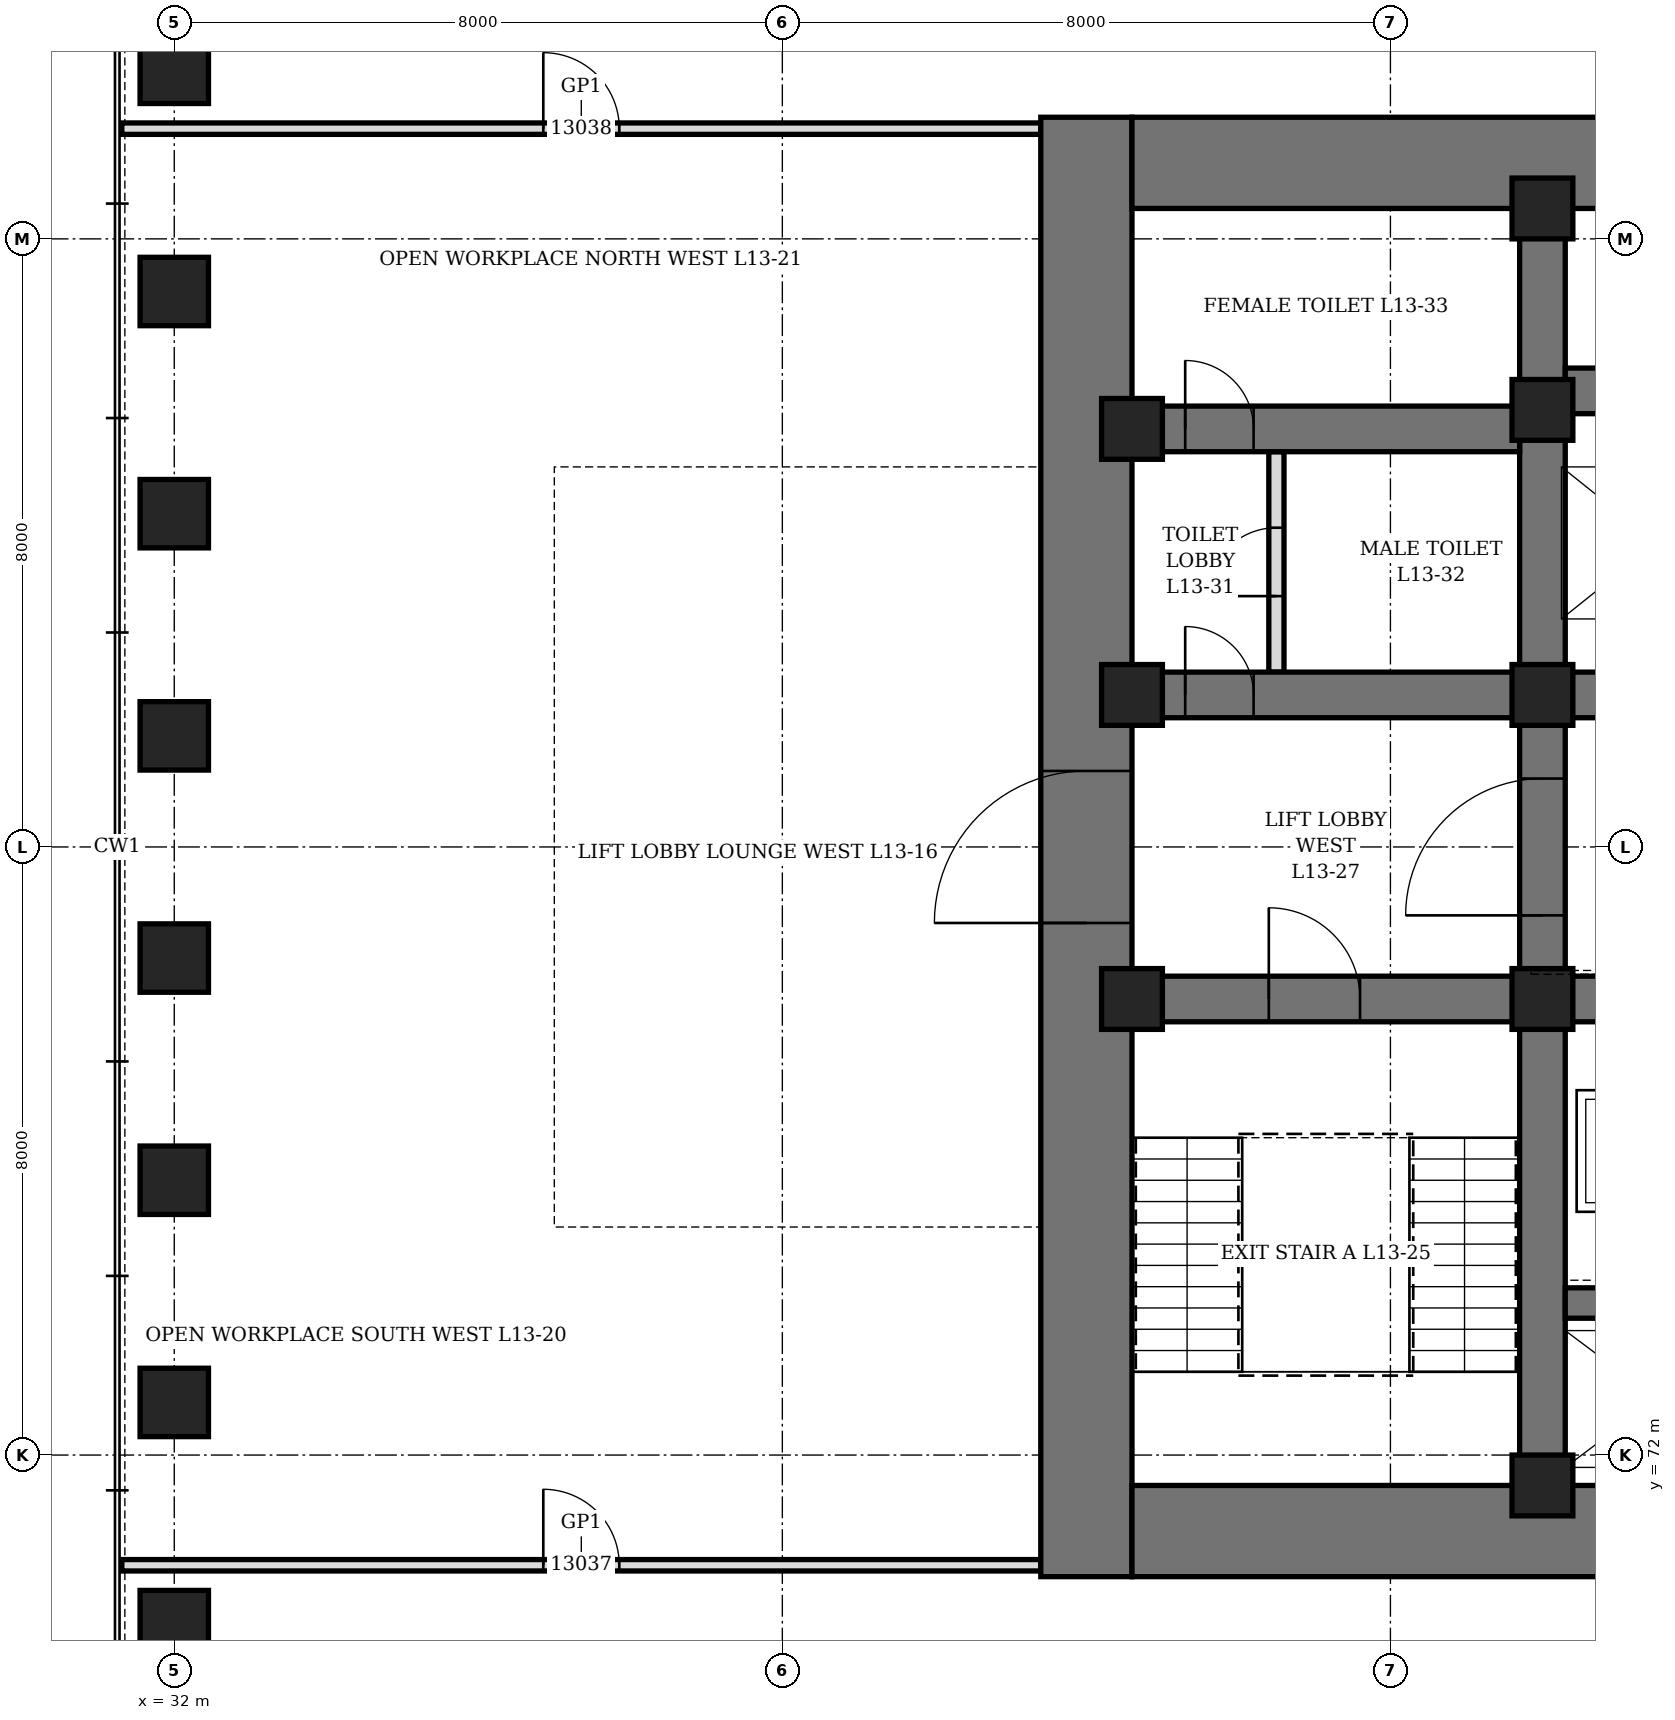
"""IFC4 building model, lengths in metres.
Left out: names, types, materials, properties, quantities, classifications, styles, units other than length and angle.
Written with IfcOpenShell. Run it as: python <this file> out.ifc"""

import sys

from ifc_helpers import new_model, si_unit, direction, frame, frame_2d, origin, origin_2d, place, context, subcontext, project, spatial, rectangle, hollow_rectangle, extrude, element, fill, save


model = new_model("IFC4")
c1 = context("Model", 3, precision=1e-05, world=origin(), true_north=direction((0.0, 1.0)))
c2 = subcontext(c1, "Body", "Model", "MODEL_VIEW")
j1 = project(units=[si_unit("LENGTHUNIT", "METRE"), si_unit("PLANEANGLEUNIT", "RADIAN")], contexts=[c1])
p1 = place(None, origin())
s1 = spatial("IfcSite", under=j1, at=p1, CompositionType="ELEMENT")
p2 = place(p1, origin())
s2 = spatial("IfcBuilding", under=s1, at=p2, CompositionType="ELEMENT")
p3 = place(p2, frame((0.0, 0.0, 64.3)))
s3 = spatial("IfcBuildingStorey", under=s2, at=p3, CompositionType="ELEMENT", Elevation=64.3)
for number, where, z_axis, x_axis in (
    (1, (32.0, 90.231, 0.0), (0.0, 0.0, 1.0), (0.0, 1.0, 0.0)),
    (2, (32.0, 87.308, 0.0), (0.0, 0.0, 1.0), (0.0, 1.0, 0.0)),
    (3, (32.0, 84.385, 0.0), (0.0, 0.0, 1.0), (0.0, 1.0, 0.0)),
    (4, (32.0, 81.461, 0.0), (0.0, 0.0, 1.0), (0.0, 1.0, 0.0)),
    (5, (32.0, 78.539, 0.0), (0.0, 0.0, 1.0), (0.0, 1.0, 0.0)),
    (6, (32.0, 75.615, 0.0), (0.0, 0.0, 1.0), (0.0, 1.0, 0.0)),
    (7, (32.0, 72.692, 0.0), (0.0, 0.0, 1.0), (0.0, 1.0, 0.0)),
    (8, (32.0, 69.769, 0.0), (0.0, 0.0, 1.0), (0.0, 1.0, 0.0)),
):
    element("IfcColumn", number, at=place(p3, frame(where, z_axis=z_axis, x_axis=x_axis)), inside=s3, PredefinedType="COLUMN", context=c2, shape_type="SweptSolid", body=[
        extrude(hollow_rectangle(XDim=0.9, YDim=0.9, WallThickness=0.12, at=origin_2d()), origin(), (0.0, 0.0, 1.0), 4.2),
    ])
p4 = place(p3, frame((44.0, 70.4, 0.0), z_axis=(0.0, 0.0, 1.0), x_axis=(0.0, 1.0, 0.0)))
e9 = element("IfcWall", 9, at=p4, inside=s3, PredefinedType="SHEAR", context=c2, shape_type="SweptSolid", body=[
    extrude(rectangle(XDim=19.2, YDim=1.2, at=frame_2d((9.6, 0.0))), origin(), (0.0, 0.0, 1.0), 4.2),
])
p5 = place(p4, frame((8.6, 0.0, 0.0)))
e10 = element("IfcOpeningElement", 10, at=p5, cuts=e9, PredefinedType="OPENING", context=c2, shape_type="SweptSolid", body=[
    extrude(rectangle(XDim=2.0, YDim=2.4, at=frame_2d((1.0, 1.2))), frame((0.0, 0.61, 0.0), z_axis=(0.0, -1.0, 0.0), x_axis=(1.0, 0.0, 0.0)), (0.0, 0.0, 1.0), 1.22),
])
p6 = place(p3, frame((44.6, 71.0, 0.0), z_axis=(0.0, 0.0, 1.0), x_axis=(1.0, 0.0, 0.0)))
e11 = element("IfcWall", 11, at=p6, inside=s3, PredefinedType="SHEAR", context=c2, shape_type="SweptSolid", body=[
    extrude(rectangle(XDim=22.8, YDim=1.2, at=frame_2d((11.4, 0.0))), origin(), (0.0, 0.0, 1.0), 4.2),
])
p7 = place(p3, frame((44.6, 89.0, 0.0), z_axis=(0.0, 0.0, 1.0), x_axis=(1.0, 0.0, 0.0)))
e12 = element("IfcWall", 12, at=p7, inside=s3, PredefinedType="SHEAR", context=c2, shape_type="SweptSolid", body=[
    extrude(rectangle(XDim=22.8, YDim=1.2, at=frame_2d((11.4, 0.0))), origin(), (0.0, 0.0, 1.0), 4.2),
])
p8 = place(p7, frame((9.2, 0.0, 0.0)))
e13 = element("IfcOpeningElement", 13, at=p8, cuts=e12, PredefinedType="OPENING", context=c2, shape_type="SweptSolid", body=[
    extrude(rectangle(XDim=1.0, YDim=2.1, at=frame_2d((0.5, 1.05))), frame((0.0, 0.61, 0.0), z_axis=(0.0, -1.0, 0.0), x_axis=(1.0, 0.0, 0.0)), (0.0, 0.0, 1.0), 1.22),
])
p9 = place(p7, frame((6.45, 0.0, 0.0)))
e14 = element("IfcOpeningElement", 14, at=p9, cuts=e12, PredefinedType="OPENING", context=c2, shape_type="SweptSolid", body=[
    extrude(rectangle(XDim=0.9, YDim=2.1, at=frame_2d((0.45, 1.05))), frame((0.0, 0.61, 0.0), z_axis=(0.0, -1.0, 0.0), x_axis=(1.0, 0.0, 0.0)), (0.0, 0.0, 1.0), 1.22),
])
p10 = place(p7, frame((12.1, 0.0, 0.0)))
e15 = element("IfcOpeningElement", 15, at=p10, cuts=e12, PredefinedType="OPENING", context=c2, shape_type="SweptSolid", body=[
    extrude(rectangle(XDim=0.9, YDim=2.1, at=frame_2d((0.45, 1.05))), frame((0.0, 0.61, 0.0), z_axis=(0.0, -1.0, 0.0), x_axis=(1.0, 0.0, 0.0)), (0.0, 0.0, 1.0), 1.22),
])
p11 = place(p7, frame((14.0, 0.0, 0.0)))
e16 = element("IfcOpeningElement", 16, at=p11, cuts=e12, PredefinedType="OPENING", context=c2, shape_type="SweptSolid", body=[
    extrude(rectangle(XDim=0.9, YDim=2.1, at=frame_2d((0.45, 1.05))), frame((0.0, 0.61, 0.0), z_axis=(0.0, -1.0, 0.0), x_axis=(1.0, 0.0, 0.0)), (0.0, 0.0, 1.0), 1.22),
])
p12 = place(p3, frame((50.0, 71.6, 0.0), z_axis=(0.0, 0.0, 1.0), x_axis=(0.0, 1.0, 0.0)))
e17 = element("IfcWall", 17, at=p12, inside=s3, PredefinedType="SHEAR", context=c2, shape_type="SweptSolid", body=[
    extrude(rectangle(XDim=16.8, YDim=0.6, at=frame_2d((8.4, 0.0))), origin(), (0.0, 0.0, 1.0), 4.2),
])
p13 = place(p12, frame((7.5, 0.0, 0.0)))
e18 = element("IfcOpeningElement", 18, at=p13, cuts=e17, PredefinedType="OPENING", context=c2, shape_type="SweptSolid", body=[
    extrude(rectangle(XDim=1.8, YDim=2.4, at=frame_2d((0.9, 1.2))), frame((0.0, 0.31, 0.0), z_axis=(0.0, -1.0, 0.0), x_axis=(1.0, 0.0, 0.0)), (0.0, 0.0, 1.0), 0.62),
])
p14 = place(p3, frame((44.6, 78.0, 0.0), z_axis=(0.0, 0.0, 1.0), x_axis=(1.0, 0.0, 0.0)))
e19 = element("IfcWall", 19, at=p14, inside=s3, PredefinedType="SHEAR", context=c2, shape_type="SweptSolid", body=[
    extrude(rectangle(XDim=5.1, YDim=0.6, at=frame_2d((2.55, 0.0))), origin(), (0.0, 0.0, 1.0), 4.2),
])
p15 = place(p14, frame((1.8, 0.0, 0.0)))
e20 = element("IfcOpeningElement", 20, at=p15, cuts=e19, PredefinedType="OPENING", context=c2, shape_type="SweptSolid", body=[
    extrude(rectangle(XDim=1.2, YDim=2.1, at=frame_2d((0.6, 1.05))), frame((0.0, 0.31, 0.0), z_axis=(0.0, -1.0, 0.0), x_axis=(1.0, 0.0, 0.0)), (0.0, 0.0, 1.0), 0.62),
])
p16 = place(p3, frame((44.6, 82.0, 0.0), z_axis=(0.0, 0.0, 1.0), x_axis=(1.0, 0.0, 0.0)))
e21 = element("IfcWall", 21, at=p16, inside=s3, PredefinedType="SHEAR", context=c2, shape_type="SweptSolid", body=[
    extrude(rectangle(XDim=5.1, YDim=0.6, at=frame_2d((2.55, 0.0))), origin(), (0.0, 0.0, 1.0), 4.2),
])
p17 = place(p16, frame((0.7, 0.0, 0.0)))
e22 = element("IfcOpeningElement", 22, at=p17, cuts=e21, PredefinedType="OPENING", context=c2, shape_type="SweptSolid", body=[
    extrude(rectangle(XDim=0.9, YDim=2.1, at=frame_2d((0.45, 1.05))), frame((0.0, 0.31, 0.0), z_axis=(0.0, -1.0, 0.0), x_axis=(1.0, 0.0, 0.0)), (0.0, 0.0, 1.0), 0.62),
])
p18 = place(p3, frame((44.6, 85.5, 0.0), z_axis=(0.0, 0.0, 1.0), x_axis=(1.0, 0.0, 0.0)))
e23 = element("IfcWall", 23, at=p18, inside=s3, PredefinedType="SHEAR", context=c2, shape_type="SweptSolid", body=[
    extrude(rectangle(XDim=5.1, YDim=0.6, at=frame_2d((2.55, 0.0))), origin(), (0.0, 0.0, 1.0), 4.2),
])
p19 = place(p18, frame((0.7, 0.0, 0.0)))
e24 = element("IfcOpeningElement", 24, at=p19, cuts=e23, PredefinedType="OPENING", context=c2, shape_type="SweptSolid", body=[
    extrude(rectangle(XDim=0.9, YDim=2.1, at=frame_2d((0.45, 1.05))), frame((0.0, 0.31, 0.0), z_axis=(0.0, -1.0, 0.0), x_axis=(1.0, 0.0, 0.0)), (0.0, 0.0, 1.0), 0.62),
])
p20 = place(p3, frame((50.3, 78.0, 0.0), z_axis=(0.0, 0.0, 1.0), x_axis=(1.0, 0.0, 0.0)))
e25 = element("IfcWall", 25, at=p20, inside=s3, PredefinedType="SHEAR", context=c2, shape_type="SweptSolid", body=[
    extrude(rectangle(XDim=11.4, YDim=0.6, at=frame_2d((5.7, 0.0))), origin(), (0.0, 0.0, 1.0), 4.2),
])
p21 = place(p20, frame((0.65, 0.0, 0.0)))
e26 = element("IfcOpeningElement", 26, at=p21, cuts=e25, PredefinedType="OPENING", context=c2, shape_type="SweptSolid", body=[
    extrude(rectangle(XDim=1.1, YDim=2.2, at=frame_2d((0.55, 1.1))), frame((0.0, 0.31, 0.0), z_axis=(0.0, -1.0, 0.0), x_axis=(1.0, 0.0, 0.0)), (0.0, 0.0, 1.0), 0.62),
])
p22 = place(p20, frame((3.65, 0.0, 0.0)))
e27 = element("IfcOpeningElement", 27, at=p22, cuts=e25, PredefinedType="OPENING", context=c2, shape_type="SweptSolid", body=[
    extrude(rectangle(XDim=1.1, YDim=2.2, at=frame_2d((0.55, 1.1))), frame((0.0, 0.31, 0.0), z_axis=(0.0, -1.0, 0.0), x_axis=(1.0, 0.0, 0.0)), (0.0, 0.0, 1.0), 0.62),
])
p23 = place(p20, frame((6.65, 0.0, 0.0)))
e28 = element("IfcOpeningElement", 28, at=p23, cuts=e25, PredefinedType="OPENING", context=c2, shape_type="SweptSolid", body=[
    extrude(rectangle(XDim=1.1, YDim=2.2, at=frame_2d((0.55, 1.1))), frame((0.0, 0.31, 0.0), z_axis=(0.0, -1.0, 0.0), x_axis=(1.0, 0.0, 0.0)), (0.0, 0.0, 1.0), 0.62),
])
p24 = place(p20, frame((9.65, 0.0, 0.0)))
e29 = element("IfcOpeningElement", 29, at=p24, cuts=e25, PredefinedType="OPENING", context=c2, shape_type="SweptSolid", body=[
    extrude(rectangle(XDim=1.1, YDim=2.2, at=frame_2d((0.55, 1.1))), frame((0.0, 0.31, 0.0), z_axis=(0.0, -1.0, 0.0), x_axis=(1.0, 0.0, 0.0)), (0.0, 0.0, 1.0), 0.62),
])
for number, where, z_axis, x_axis in (
    (30, (50.3, 82.0, 0.0), (0.0, 0.0, 1.0), (1.0, 0.0, 0.0)),
    (31, (50.3, 86.0, 0.0), (0.0, 0.0, 1.0), (1.0, 0.0, 0.0)),
):
    element("IfcWall", number, at=place(p3, frame(where, z_axis=z_axis, x_axis=x_axis)), inside=s3, PredefinedType="SHEAR", context=c2, shape_type="SweptSolid", body=[
        extrude(rectangle(XDim=11.4, YDim=0.6, at=frame_2d((5.7, 0.0))), origin(), (0.0, 0.0, 1.0), 4.2),
    ])
p25 = place(p3, frame((50.3, 74.0, 0.0), z_axis=(0.0, 0.0, 1.0), x_axis=(1.0, 0.0, 0.0)))
e32 = element("IfcWall", 32, at=p25, inside=s3, PredefinedType="SHEAR", context=c2, shape_type="SweptSolid", body=[
    extrude(rectangle(XDim=11.4, YDim=0.4, at=frame_2d((5.7, 0.0))), origin(), (0.0, 0.0, 1.0), 4.2),
])
for number, where, z_axis, x_axis in (
    (33, (44.6, 78.0, 0.0), (0.0, 0.0, 1.0), (1.0, 0.0, 0.0)),
    (34, (44.6, 82.0, 0.0), (0.0, 0.0, 1.0), (1.0, 0.0, 0.0)),
    (35, (44.6, 85.5, 0.0), (0.0, 0.0, 1.0), (1.0, 0.0, 0.0)),
    (36, (50.0, 71.6, 0.0), (0.0, 0.0, 1.0), (1.0, 0.0, 0.0)),
    (37, (50.0, 78.0, 0.0), (0.0, 0.0, 1.0), (1.0, 0.0, 0.0)),
    (38, (50.0, 82.0, 0.0), (0.0, 0.0, 1.0), (1.0, 0.0, 0.0)),
    (39, (50.0, 85.75, 0.0), (0.0, 0.0, 1.0), (1.0, 0.0, 0.0)),
    (40, (50.0, 88.4, 0.0), (0.0, 0.0, 1.0), (1.0, 0.0, 0.0)),
):
    element("IfcColumn", number, at=place(p3, frame(where, z_axis=z_axis, x_axis=x_axis)), inside=s3, PredefinedType="COLUMN", context=c2, shape_type="SweptSolid", body=[
        extrude(hollow_rectangle(XDim=0.8, YDim=0.8, WallThickness=0.1, at=origin_2d()), origin(), (0.0, 0.0, 1.0), 4.2),
    ])
p26 = place(p3, frame((46.5, 82.3, 0.0), z_axis=(0.0, 0.0, 1.0), x_axis=(0.0, 1.0, 0.0)))
e41 = element("IfcWall", 41, at=p26, inside=s3, PredefinedType="PARTITIONING", context=c2, shape_type="SweptSolid", body=[
    extrude(rectangle(XDim=2.9, YDim=0.2, at=frame_2d((1.45, 0.0))), origin(), (0.0, 0.0, 1.0), 4.04),
])
p27 = place(p26, frame((1.0, 0.0, 0.0)))
e42 = element("IfcOpeningElement", 42, at=p27, cuts=e41, PredefinedType="OPENING", context=c2, shape_type="SweptSolid", body=[
    extrude(rectangle(XDim=0.9, YDim=2.1, at=frame_2d((0.45, 1.05))), frame((0.0, 0.11, 0.0), z_axis=(0.0, -1.0, 0.0), x_axis=(1.0, 0.0, 0.0)), (0.0, 0.0, 1.0), 0.22),
])
p28 = place(p3, frame((31.31, 70.55, 0.0), z_axis=(0.0, 0.0, 1.0), x_axis=(1.0, 0.0, 0.0)))
e43 = element("IfcWall", 43, at=p28, inside=s3, PredefinedType="PARTITIONING", context=c2, shape_type="SweptSolid", body=[
    extrude(rectangle(XDim=12.09, YDim=0.15, at=frame_2d((6.045, 0.0))), origin(), (0.0, 0.0, 1.0), 4.04),
])
p29 = place(p28, frame((5.545, 0.0, 0.0)))
e44 = element("IfcOpeningElement", 44, at=p29, cuts=e43, PredefinedType="OPENING", context=c2, shape_type="SweptSolid", body=[
    extrude(rectangle(XDim=1.0, YDim=2.4, at=frame_2d((0.5, 1.2))), frame((0.0, 0.085, 0.0), z_axis=(0.0, -1.0, 0.0), x_axis=(1.0, 0.0, 0.0)), (0.0, 0.0, 1.0), 0.17),
])
p30 = place(p3, frame((31.31, 89.45, 0.0), z_axis=(0.0, 0.0, 1.0), x_axis=(1.0, 0.0, 0.0)))
e45 = element("IfcWall", 45, at=p30, inside=s3, PredefinedType="PARTITIONING", context=c2, shape_type="SweptSolid", body=[
    extrude(rectangle(XDim=12.09, YDim=0.15, at=frame_2d((6.045, 0.0))), origin(), (0.0, 0.0, 1.0), 4.04),
])
p31 = place(p30, frame((5.545, 0.0, 0.0)))
e46 = element("IfcOpeningElement", 46, at=p31, cuts=e45, PredefinedType="OPENING", context=c2, shape_type="SweptSolid", body=[
    extrude(rectangle(XDim=1.0, YDim=2.4, at=frame_2d((0.5, 1.2))), frame((0.0, 0.085, 0.0), z_axis=(0.0, -1.0, 0.0), x_axis=(1.0, 0.0, 0.0)), (0.0, 0.0, 1.0), 0.17),
])
p32 = place(p17, origin())
e47 = element("IfcDoor", 47, at=p32, inside=s3, OperationType="SINGLE_SWING_LEFT", PredefinedType="DOOR", context=c2, shape_type="SweptSolid", body=[
    extrude(rectangle(XDim=0.9, YDim=2.1, at=frame_2d((0.45, 1.05))), frame((0.0, 0.3, 0.0), z_axis=(0.0, -1.0, 0.0), x_axis=(1.0, 0.0, 0.0)), (0.0, 0.0, 1.0), 0.6),
])
fill(e22, e47)
p33 = place(p27, origin())
e48 = element("IfcDoor", 48, at=p33, inside=s3, OperationType="SINGLE_SWING_RIGHT", PredefinedType="DOOR", context=c2, shape_type="SweptSolid", body=[
    extrude(rectangle(XDim=0.9, YDim=2.1, at=frame_2d((0.45, 1.05))), frame((0.0, 0.1, 0.0), z_axis=(0.0, -1.0, 0.0), x_axis=(1.0, 0.0, 0.0)), (0.0, 0.0, 1.0), 0.199),
])
fill(e42, e48)
p34 = place(p19, origin())
e49 = element("IfcDoor", 49, at=p34, inside=s3, OperationType="SINGLE_SWING_RIGHT", PredefinedType="DOOR", context=c2, shape_type="SweptSolid", body=[
    extrude(rectangle(XDim=0.9, YDim=2.1, at=frame_2d((0.45, 1.05))), frame((0.0, 0.3, 0.0), z_axis=(0.0, -1.0, 0.0), x_axis=(1.0, 0.0, 0.0)), (0.0, 0.0, 1.0), 0.6),
])
fill(e24, e49)
p35 = place(p15, origin())
e50 = element("IfcDoor", 50, at=p35, inside=s3, OperationType="SINGLE_SWING_LEFT", PredefinedType="DOOR", context=c2, shape_type="SweptSolid", body=[
    extrude(rectangle(XDim=1.2, YDim=2.1, at=frame_2d((0.6, 1.05))), frame((0.0, 0.3, 0.0), z_axis=(0.0, -1.0, 0.0), x_axis=(1.0, 0.0, 0.0)), (0.0, 0.0, 1.0), 0.6),
])
fill(e20, e50)
p36 = place(p5, origin())
e51 = element("IfcDoor", 51, at=p36, inside=s3, OperationType="DOUBLE_DOOR_SINGLE_SWING", PredefinedType="DOOR", context=c2, shape_type="SweptSolid", body=[
    extrude(rectangle(XDim=2.0, YDim=2.4, at=frame_2d((1.0, 1.2))), frame((0.0, 0.35, 0.0), z_axis=(0.0, -1.0, 0.0), x_axis=(1.0, 0.0, 0.0)), (0.0, 0.0, 1.0), 0.7),
])
fill(e10, e51)
p37 = place(p13, origin())
e52 = element("IfcDoor", 52, at=p37, inside=s3, OperationType="DOUBLE_DOOR_SINGLE_SWING", PredefinedType="DOOR", context=c2, shape_type="SweptSolid", body=[
    extrude(rectangle(XDim=1.8, YDim=2.4, at=frame_2d((0.9, 1.2))), frame((0.0, 0.3, 0.0), z_axis=(0.0, -1.0, 0.0), x_axis=(1.0, 0.0, 0.0)), (0.0, 0.0, 1.0), 0.6),
])
fill(e18, e52)
p38 = place(p29, origin())
e53 = element("IfcDoor", 53, at=p38, inside=s3, OperationType="SINGLE_SWING_RIGHT", PredefinedType="DOOR", context=c2, shape_type="SweptSolid", body=[
    extrude(rectangle(XDim=1.0, YDim=2.4, at=frame_2d((0.5, 1.2))), frame((0.0, 0.075, 0.0), z_axis=(0.0, -1.0, 0.0), x_axis=(1.0, 0.0, 0.0)), (0.0, 0.0, 1.0), 0.149),
])
fill(e44, e53)
p39 = place(p31, origin())
e54 = element("IfcDoor", 54, at=p39, inside=s3, OperationType="SINGLE_SWING_RIGHT", PredefinedType="DOOR", context=c2, shape_type="SweptSolid", body=[
    extrude(rectangle(XDim=1.0, YDim=2.4, at=frame_2d((0.5, 1.2))), frame((0.0, 0.075, 0.0), z_axis=(0.0, -1.0, 0.0), x_axis=(1.0, 0.0, 0.0)), (0.0, 0.0, 1.0), 0.149),
])
fill(e46, e54)
save(model, sys.argv[1])
